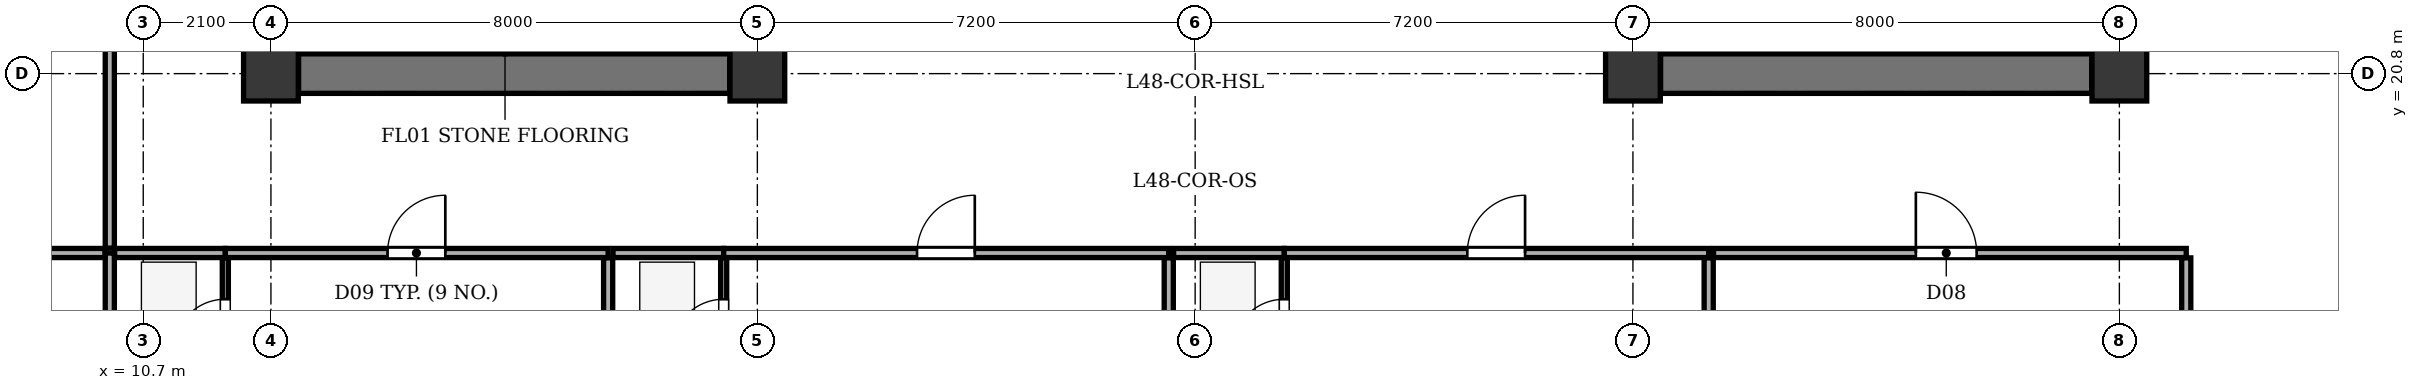
"""IFC4 building model, lengths in metres.
Left out: names, types, materials, properties, quantities, classifications, styles, units other than length and angle.
Written with IfcOpenShell. Run it as: python <this file> out.ifc"""

import sys

from ifc_helpers import new_model, si_unit, direction, frame, frame_2d, origin, origin_2d, place, context, subcontext, project, spatial, rectangle, extrude, element, fill, save


model = new_model("IFC4")
c1 = context("Model", 3, precision=1e-05, world=origin(), true_north=direction((0.0, 1.0)))
c2 = subcontext(c1, "Body", "Model", "MODEL_VIEW")
j1 = project(units=[si_unit("LENGTHUNIT", "METRE"), si_unit("PLANEANGLEUNIT", "RADIAN")], contexts=[c1])
p1 = place(None, origin())
s1 = spatial("IfcSite", under=j1, at=p1, CompositionType="ELEMENT")
p2 = place(p1, origin())
s2 = spatial("IfcBuilding", under=s1, at=p2, CompositionType="ELEMENT")
p3 = place(p2, frame((0.0, 0.0, 186.8)))
s3 = spatial("IfcBuildingStorey", under=s2, at=p3, CompositionType="ELEMENT", Elevation=186.8)
for number, where, z_axis, x_axis in (
    (1, (12.8, 20.8, 0.0), (0.0, 0.0, 1.0), (1.0, 0.0, 0.0)),
    (2, (20.8, 20.8, 0.0), (0.0, 0.0, 1.0), (1.0, 0.0, 0.0)),
    (3, (35.2, 20.8, 0.0), (0.0, 0.0, 1.0), (1.0, 0.0, 0.0)),
    (4, (43.2, 20.8, 0.0), (0.0, 0.0, 1.0), (1.0, 0.0, 0.0)),
):
    element("IfcColumn", number, at=place(p3, frame(where, z_axis=z_axis, x_axis=x_axis)), inside=s3, PredefinedType="COLUMN", context=c2, shape_type="SweptSolid", body=[
        extrude(rectangle(XDim=0.9, YDim=0.9, at=origin_2d()), origin(), (0.0, 0.0, 1.0), 3.5),
    ])
p4 = place(p3, frame((13.255, 20.8, 0.0), z_axis=(0.0, 0.0, 1.0), x_axis=(1.0, 0.0, 0.0)))
e5 = element("IfcWall", 5, at=p4, inside=s3, PredefinedType="SHEAR", context=c2, shape_type="SweptSolid", body=[
    extrude(rectangle(XDim=7.09, YDim=0.65, at=frame_2d((3.545, 0.0))), origin(), (0.0, 0.0, 1.0), 3.2),
])
p5 = place(p3, frame((16.435, 21.135, 0.0), z_axis=(0.0, 0.0, 1.0), x_axis=(0.0, 1.0, 0.0)))
e6 = element("IfcWall", 6, at=p5, inside=s3, PredefinedType="SHEAR", context=c2, shape_type="SweptSolid", body=[
    extrude(rectangle(XDim=12.13, YDim=0.25, at=frame_2d((6.065, 0.0))), origin(), (0.0, 0.0, 1.0), 3.2),
])
p6 = place(p5, frame((0.515, 0.0, 0.0)))
e7 = element("IfcOpeningElement", 7, at=p6, cuts=e6, PredefinedType="OPENING", context=c2, shape_type="SweptSolid", body=[
    extrude(rectangle(XDim=1.2, YDim=2.15, at=frame_2d((0.6, 1.075))), frame((0.0, 0.135, 0.0), z_axis=(0.0, -1.0, 0.0), x_axis=(1.0, 0.0, 0.0)), (0.0, 0.0, 1.0), 0.27),
])
p7 = place(p5, frame((2.665, 0.0, 0.0)))
e8 = element("IfcOpeningElement", 8, at=p7, cuts=e6, PredefinedType="OPENING", context=c2, shape_type="SweptSolid", body=[
    extrude(rectangle(XDim=1.15, YDim=2.15, at=frame_2d((0.575, 1.075))), frame((0.0, 0.135, 0.0), z_axis=(0.0, -1.0, 0.0), x_axis=(1.0, 0.0, 0.0)), (0.0, 0.0, 1.0), 0.27),
])
p8 = place(p3, frame((35.655, 20.8, 0.0), z_axis=(0.0, 0.0, 1.0), x_axis=(1.0, 0.0, 0.0)))
e9 = element("IfcWall", 9, at=p8, inside=s3, PredefinedType="SHEAR", context=c2, shape_type="SweptSolid", body=[
    extrude(rectangle(XDim=7.09, YDim=0.65, at=frame_2d((3.545, 0.0))), origin(), (0.0, 0.0, 1.0), 3.2),
])
p9 = place(p3, frame((39.565, 21.135, 0.0), z_axis=(0.0, 0.0, 1.0), x_axis=(0.0, 1.0, 0.0)))
e10 = element("IfcWall", 10, at=p9, inside=s3, PredefinedType="SHEAR", context=c2, shape_type="SweptSolid", body=[
    extrude(rectangle(XDim=12.13, YDim=0.25, at=frame_2d((6.065, 0.0))), origin(), (0.0, 0.0, 1.0), 3.2),
])
p10 = place(p9, frame((0.515, 0.0, 0.0)))
e11 = element("IfcOpeningElement", 11, at=p10, cuts=e10, PredefinedType="OPENING", context=c2, shape_type="SweptSolid", body=[
    extrude(rectangle(XDim=1.2, YDim=2.15, at=frame_2d((0.6, 1.075))), frame((0.0, 0.135, 0.0), z_axis=(0.0, -1.0, 0.0), x_axis=(1.0, 0.0, 0.0)), (0.0, 0.0, 1.0), 0.27),
])
p11 = place(p9, frame((2.665, 0.0, 0.0)))
e12 = element("IfcOpeningElement", 12, at=p11, cuts=e10, PredefinedType="OPENING", context=c2, shape_type="SweptSolid", body=[
    extrude(rectangle(XDim=1.15, YDim=2.15, at=frame_2d((0.575, 1.075))), frame((0.0, 0.135, 0.0), z_axis=(0.0, -1.0, 0.0), x_axis=(1.0, 0.0, 0.0)), (0.0, 0.0, 1.0), 0.27),
])
p12 = place(p3, frame((10.15, 8.275, 0.0), z_axis=(0.0, 0.0, 1.0), x_axis=(0.0, 1.0, 0.0)))
e13 = element("IfcWall", 13, at=p12, inside=s3, PredefinedType="PARTITIONING", context=c2, shape_type="SweptSolid", body=[
    extrude(rectangle(XDim=9.575, YDim=0.15, at=frame_2d((4.788, 0.0))), origin(), (0.0, 0.0, 1.0), 3.2),
])
p13 = place(p3, frame((10.23, 17.85, 0.0), z_axis=(0.0, 0.0, 1.0), x_axis=(1.0, 0.0, 0.0)))
e14 = element("IfcWall", 14, at=p13, inside=s3, PredefinedType="PARTITIONING", context=c2, shape_type="SweptSolid", body=[
    extrude(rectangle(XDim=1.82, YDim=0.15, at=frame_2d((0.91, 0.0))), origin(), (0.0, 0.0, 1.0), 3.2),
])
p14 = place(p3, frame((12.05, 17.85, 0.0), z_axis=(0.0, 0.0, 1.0), x_axis=(1.0, 0.0, 0.0)))
e15 = element("IfcWall", 15, at=p14, inside=s3, PredefinedType="PARTITIONING", context=c2, shape_type="SweptSolid", body=[
    extrude(rectangle(XDim=6.296, YDim=0.15, at=frame_2d((3.148, 0.0))), origin(), (0.0, 0.0, 1.0), 3.2),
])
p15 = place(p14, frame((2.668, 0.0, 0.0)))
e16 = element("IfcOpeningElement", 16, at=p15, cuts=e15, PredefinedType="OPENING", context=c2, shape_type="SweptSolid", body=[
    extrude(rectangle(XDim=0.95, YDim=2.1, at=frame_2d((0.475, 1.05))), frame((0.0, 0.085, 0.0), z_axis=(0.0, -1.0, 0.0), x_axis=(1.0, 0.0, 0.0)), (0.0, 0.0, 1.0), 0.17),
])
p16 = place(p3, frame((12.05, 15.52, 0.0), z_axis=(0.0, 0.0, 1.0), x_axis=(0.0, 1.0, 0.0)))
e17 = element("IfcWall", 17, at=p16, inside=s3, PredefinedType="PARTITIONING", context=c2, shape_type="SweptSolid", body=[
    extrude(rectangle(XDim=2.25, YDim=0.1, at=frame_2d((1.125, 0.0))), origin(), (0.0, 0.0, 1.0), 3.2),
])
p17 = place(p16, frame((0.72, 0.0, 0.0)))
e18 = element("IfcOpeningElement", 18, at=p17, cuts=e17, PredefinedType="OPENING", context=c2, shape_type="SweptSolid", body=[
    extrude(rectangle(XDim=0.85, YDim=2.05, at=frame_2d((0.425, 1.025))), frame((0.0, 0.06, 0.0), z_axis=(0.0, -1.0, 0.0), x_axis=(1.0, 0.0, 0.0)), (0.0, 0.0, 1.0), 0.12),
])
p18 = place(p3, frame((18.346, 8.275, 0.0), z_axis=(0.0, 0.0, 1.0), x_axis=(0.0, 1.0, 0.0)))
e19 = element("IfcWall", 19, at=p18, inside=s3, PredefinedType="PARTITIONING", context=c2, shape_type="SweptSolid", body=[
    extrude(rectangle(XDim=9.495, YDim=0.15, at=frame_2d((4.748, 0.0))), origin(), (0.0, 0.0, 1.0), 3.2),
])
p19 = place(p3, frame((18.426, 17.85, 0.0), z_axis=(0.0, 0.0, 1.0), x_axis=(1.0, 0.0, 0.0)))
e20 = element("IfcWall", 20, at=p19, inside=s3, PredefinedType="PARTITIONING", context=c2, shape_type="SweptSolid", body=[
    extrude(rectangle(XDim=1.82, YDim=0.15, at=frame_2d((0.91, 0.0))), origin(), (0.0, 0.0, 1.0), 3.2),
])
p20 = place(p3, frame((20.246, 17.85, 0.0), z_axis=(0.0, 0.0, 1.0), x_axis=(1.0, 0.0, 0.0)))
e21 = element("IfcWall", 21, at=p20, inside=s3, PredefinedType="PARTITIONING", context=c2, shape_type="SweptSolid", body=[
    extrude(rectangle(XDim=7.32, YDim=0.15, at=frame_2d((3.66, 0.0))), origin(), (0.0, 0.0, 1.0), 3.2),
])
p21 = place(p20, frame((3.18, 0.0, 0.0)))
e22 = element("IfcOpeningElement", 22, at=p21, cuts=e21, PredefinedType="OPENING", context=c2, shape_type="SweptSolid", body=[
    extrude(rectangle(XDim=0.95, YDim=2.1, at=frame_2d((0.475, 1.05))), frame((0.0, 0.085, 0.0), z_axis=(0.0, -1.0, 0.0), x_axis=(1.0, 0.0, 0.0)), (0.0, 0.0, 1.0), 0.17),
])
p22 = place(p3, frame((20.246, 15.52, 0.0), z_axis=(0.0, 0.0, 1.0), x_axis=(0.0, 1.0, 0.0)))
e23 = element("IfcWall", 23, at=p22, inside=s3, PredefinedType="PARTITIONING", context=c2, shape_type="SweptSolid", body=[
    extrude(rectangle(XDim=2.25, YDim=0.1, at=frame_2d((1.125, 0.0))), origin(), (0.0, 0.0, 1.0), 3.2),
])
p23 = place(p22, frame((0.72, 0.0, 0.0)))
e24 = element("IfcOpeningElement", 24, at=p23, cuts=e23, PredefinedType="OPENING", context=c2, shape_type="SweptSolid", body=[
    extrude(rectangle(XDim=0.85, YDim=2.05, at=frame_2d((0.425, 1.025))), frame((0.0, 0.06, 0.0), z_axis=(0.0, -1.0, 0.0), x_axis=(1.0, 0.0, 0.0)), (0.0, 0.0, 1.0), 0.12),
])
p24 = place(p3, frame((27.566, 8.275, 0.0), z_axis=(0.0, 0.0, 1.0), x_axis=(0.0, 1.0, 0.0)))
e25 = element("IfcWall", 25, at=p24, inside=s3, PredefinedType="PARTITIONING", context=c2, shape_type="SweptSolid", body=[
    extrude(rectangle(XDim=9.495, YDim=0.15, at=frame_2d((4.748, 0.0))), origin(), (0.0, 0.0, 1.0), 3.2),
])
p25 = place(p3, frame((27.646, 17.85, 0.0), z_axis=(0.0, 0.0, 1.0), x_axis=(1.0, 0.0, 0.0)))
e26 = element("IfcWall", 26, at=p25, inside=s3, PredefinedType="PARTITIONING", context=c2, shape_type="SweptSolid", body=[
    extrude(rectangle(XDim=1.82, YDim=0.15, at=frame_2d((0.91, 0.0))), origin(), (0.0, 0.0, 1.0), 3.2),
])
p26 = place(p3, frame((29.466, 17.85, 0.0), z_axis=(0.0, 0.0, 1.0), x_axis=(1.0, 0.0, 0.0)))
e27 = element("IfcWall", 27, at=p26, inside=s3, PredefinedType="PARTITIONING", context=c2, shape_type="SweptSolid", body=[
    extrude(rectangle(XDim=6.98, YDim=0.15, at=frame_2d((3.49, 0.0))), origin(), (0.0, 0.0, 1.0), 3.2),
])
p27 = place(p26, frame((3.01, 0.0, 0.0)))
e28 = element("IfcOpeningElement", 28, at=p27, cuts=e27, PredefinedType="OPENING", context=c2, shape_type="SweptSolid", body=[
    extrude(rectangle(XDim=0.95, YDim=2.1, at=frame_2d((0.475, 1.05))), frame((0.0, 0.085, 0.0), z_axis=(0.0, -1.0, 0.0), x_axis=(1.0, 0.0, 0.0)), (0.0, 0.0, 1.0), 0.17),
])
p28 = place(p3, frame((29.466, 15.52, 0.0), z_axis=(0.0, 0.0, 1.0), x_axis=(0.0, 1.0, 0.0)))
e29 = element("IfcWall", 29, at=p28, inside=s3, PredefinedType="PARTITIONING", context=c2, shape_type="SweptSolid", body=[
    extrude(rectangle(XDim=2.25, YDim=0.1, at=frame_2d((1.125, 0.0))), origin(), (0.0, 0.0, 1.0), 3.2),
])
p29 = place(p28, frame((0.72, 0.0, 0.0)))
e30 = element("IfcOpeningElement", 30, at=p29, cuts=e29, PredefinedType="OPENING", context=c2, shape_type="SweptSolid", body=[
    extrude(rectangle(XDim=0.85, YDim=2.05, at=frame_2d((0.425, 1.025))), frame((0.0, 0.06, 0.0), z_axis=(0.0, -1.0, 0.0), x_axis=(1.0, 0.0, 0.0)), (0.0, 0.0, 1.0), 0.12),
])
p30 = place(p3, frame((36.446, 8.275, 0.0), z_axis=(0.0, 0.0, 1.0), x_axis=(0.0, 1.0, 0.0)))
e31 = element("IfcWall", 31, at=p30, inside=s3, PredefinedType="PARTITIONING", context=c2, shape_type="SweptSolid", body=[
    extrude(rectangle(XDim=9.495, YDim=0.15, at=frame_2d((4.748, 0.0))), origin(), (0.0, 0.0, 1.0), 3.2),
])
p31 = place(p3, frame((36.526, 17.85, 0.0), z_axis=(0.0, 0.0, 1.0), x_axis=(1.0, 0.0, 0.0)))
e32 = element("IfcWall", 32, at=p31, inside=s3, PredefinedType="PARTITIONING", context=c2, shape_type="SweptSolid", body=[
    extrude(rectangle(XDim=7.774, YDim=0.15, at=frame_2d((3.887, 0.0))), origin(), (0.0, 0.0, 1.0), 3.2),
])
p32 = place(p31, frame((3.327, 0.0, 0.0)))
e33 = element("IfcOpeningElement", 33, at=p32, cuts=e32, PredefinedType="OPENING", context=c2, shape_type="SweptSolid", body=[
    extrude(rectangle(XDim=1.0, YDim=2.1, at=frame_2d((0.5, 1.05))), frame((0.0, 0.085, 0.0), z_axis=(0.0, -1.0, 0.0), x_axis=(1.0, 0.0, 0.0)), (0.0, 0.0, 1.0), 0.17),
])
p33 = place(p3, frame((44.3, 8.275, 0.0), z_axis=(0.0, 0.0, 1.0), x_axis=(0.0, 1.0, 0.0)))
e34 = element("IfcWall", 34, at=p33, inside=s3, PredefinedType="PARTITIONING", context=c2, shape_type="SweptSolid", body=[
    extrude(rectangle(XDim=9.495, YDim=0.15, at=frame_2d((4.748, 0.0))), origin(), (0.0, 0.0, 1.0), 3.2),
])
p34 = place(p3, frame((4.675, 17.85, 0.0), z_axis=(0.0, 0.0, 1.0), x_axis=(1.0, 0.0, 0.0)))
e35 = element("IfcWall", 35, at=p34, inside=s3, PredefinedType="PARTITIONING", context=c2, shape_type="SweptSolid", body=[
    extrude(rectangle(XDim=5.395, YDim=0.15, at=frame_2d((2.698, 0.0))), origin(), (0.0, 0.0, 1.0), 3.2),
])
p35 = place(p3, frame((10.15, 17.93, 0.0), z_axis=(0.0, 0.0, 1.0), x_axis=(0.0, 1.0, 0.0)))
e36 = element("IfcWall", 36, at=p35, inside=s3, PredefinedType="PARTITIONING", context=c2, shape_type="SweptSolid", body=[
    extrude(rectangle(XDim=18.54, YDim=0.15, at=frame_2d((9.27, 0.0))), origin(), (0.0, 0.0, 1.0), 3.2),
])
p36 = place(p35, frame((8.79, 0.0, 0.0)))
e37 = element("IfcOpeningElement", 37, at=p36, cuts=e36, PredefinedType="OPENING", context=c2, shape_type="SweptSolid", body=[
    extrude(rectangle(XDim=0.95, YDim=2.1, at=frame_2d((0.475, 1.05))), frame((0.0, 0.085, 0.0), z_axis=(0.0, -1.0, 0.0), x_axis=(1.0, 0.0, 0.0)), (0.0, 0.0, 1.0), 0.17),
])
p37 = place(p17, origin())
e38 = element("IfcDoor", 38, at=p37, inside=s3, OperationType="SINGLE_SWING_LEFT", PredefinedType="DOOR", context=c2, shape_type="SweptSolid", body=[
    extrude(rectangle(XDim=0.85, YDim=2.05, at=frame_2d((0.425, 1.025))), frame((0.0, 0.025, 0.0), z_axis=(0.0, -1.0, 0.0), x_axis=(1.0, 0.0, 0.0)), (0.0, 0.0, 1.0), 0.05),
])
fill(e18, e38)
p38 = place(p15, origin())
e39 = element("IfcDoor", 39, at=p38, inside=s3, OperationType="SINGLE_SWING_RIGHT", PredefinedType="DOOR", context=c2, shape_type="SweptSolid", body=[
    extrude(rectangle(XDim=0.95, YDim=2.1, at=frame_2d((0.475, 1.05))), frame((0.0, 0.025, 0.0), z_axis=(0.0, -1.0, 0.0), x_axis=(1.0, 0.0, 0.0)), (0.0, 0.0, 1.0), 0.05),
])
fill(e16, e39)
p39 = place(p23, origin())
e40 = element("IfcDoor", 40, at=p39, inside=s3, OperationType="SINGLE_SWING_LEFT", PredefinedType="DOOR", context=c2, shape_type="SweptSolid", body=[
    extrude(rectangle(XDim=0.85, YDim=2.05, at=frame_2d((0.425, 1.025))), frame((0.0, 0.025, 0.0), z_axis=(0.0, -1.0, 0.0), x_axis=(1.0, 0.0, 0.0)), (0.0, 0.0, 1.0), 0.05),
])
fill(e24, e40)
p40 = place(p21, origin())
e41 = element("IfcDoor", 41, at=p40, inside=s3, OperationType="SINGLE_SWING_RIGHT", PredefinedType="DOOR", context=c2, shape_type="SweptSolid", body=[
    extrude(rectangle(XDim=0.95, YDim=2.1, at=frame_2d((0.475, 1.05))), frame((0.0, 0.025, 0.0), z_axis=(0.0, -1.0, 0.0), x_axis=(1.0, 0.0, 0.0)), (0.0, 0.0, 1.0), 0.05),
])
fill(e22, e41)
p41 = place(p29, origin())
e42 = element("IfcDoor", 42, at=p41, inside=s3, OperationType="SINGLE_SWING_LEFT", PredefinedType="DOOR", context=c2, shape_type="SweptSolid", body=[
    extrude(rectangle(XDim=0.85, YDim=2.05, at=frame_2d((0.425, 1.025))), frame((0.0, 0.025, 0.0), z_axis=(0.0, -1.0, 0.0), x_axis=(1.0, 0.0, 0.0)), (0.0, 0.0, 1.0), 0.05),
])
fill(e30, e42)
p42 = place(p27, origin())
e43 = element("IfcDoor", 43, at=p42, inside=s3, OperationType="SINGLE_SWING_RIGHT", PredefinedType="DOOR", context=c2, shape_type="SweptSolid", body=[
    extrude(rectangle(XDim=0.95, YDim=2.1, at=frame_2d((0.475, 1.05))), frame((0.0, 0.025, 0.0), z_axis=(0.0, -1.0, 0.0), x_axis=(1.0, 0.0, 0.0)), (0.0, 0.0, 1.0), 0.05),
])
fill(e28, e43)
p43 = place(p32, origin())
e44 = element("IfcDoor", 44, at=p43, inside=s3, OperationType="SINGLE_SWING_LEFT", PredefinedType="DOOR", context=c2, shape_type="SweptSolid", body=[
    extrude(rectangle(XDim=1.0, YDim=2.1, at=frame_2d((0.5, 1.05))), frame((0.0, 0.025, 0.0), z_axis=(0.0, -1.0, 0.0), x_axis=(1.0, 0.0, 0.0)), (0.0, 0.0, 1.0), 0.05),
])
fill(e33, e44)
save(model, sys.argv[1])
